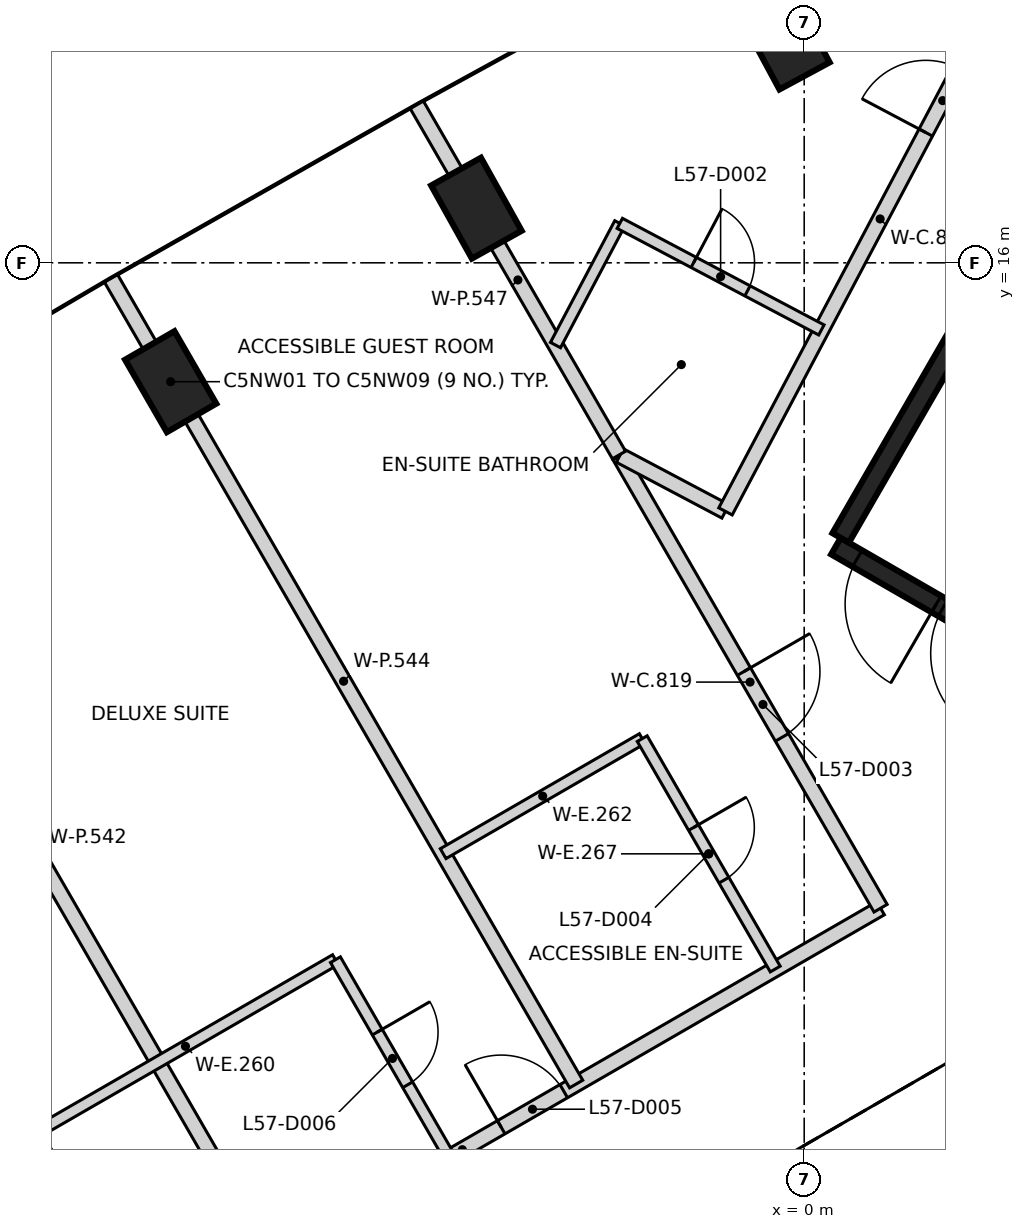
"""IFC4 building model, lengths in metres.
Left out: names, types, materials, properties, quantities, classifications, styles, units other than length and angle.
Written with IfcOpenShell. Run it as: python <this file> out.ifc"""

import sys

from ifc_helpers import new_model, si_unit, direction, frame, frame_2d, origin, origin_2d, place, context, subcontext, project, spatial, rectangle, extrude, element, fill, save


model = new_model("IFC4")
c1 = context("Model", 3, precision=1e-05, world=origin(), true_north=direction((0.0, 1.0)))
c2 = subcontext(c1, "Body", "Model", "MODEL_VIEW")
j1 = project(units=[si_unit("LENGTHUNIT", "METRE"), si_unit("PLANEANGLEUNIT", "RADIAN")], contexts=[c1])
p1 = place(None, origin())
s1 = spatial("IfcSite", under=j1, at=p1, CompositionType="ELEMENT")
p2 = place(p1, origin())
s2 = spatial("IfcBuilding", under=s1, at=p2, CompositionType="ELEMENT")
p3 = place(p2, frame((0.0, 0.0, 228.6)))
s3 = spatial("IfcBuildingStorey", under=s2, at=p3, CompositionType="ELEMENT", Elevation=228.6)
for number, where, z_axis, x_axis in (
    (1, (-0.256, 18.943, -0.35), (0.0, 0.0, 1.0), (-0.475, 0.88, 0.0)),
    (2, (-4.312, 16.719, -0.35), (0.0, 0.0, 1.0), (-0.487, 0.873, 0.0)),
    (3, (-8.335, 14.436, -0.35), (0.0, 0.0, 1.0), (-0.5, 0.866, 0.0)),
):
    element("IfcColumn", number, at=place(p3, frame(where, z_axis=z_axis, x_axis=x_axis)), inside=s3, PredefinedType="COLUMN", context=c2, shape_type="SweptSolid", body=[
        extrude(rectangle(XDim=1.1, YDim=0.75, at=origin_2d()), origin(), (0.0, 0.0, 1.0), 3.6),
    ])
p4 = place(p3, frame((10.42, 6.498, 0.0), z_axis=(0.0, 0.0, 1.0), x_axis=(-0.866021906294, 0.500006057782, 0.0)))
e4 = element("IfcWall", 4, at=p4, inside=s3, PredefinedType="SHEAR", context=c2, shape_type="SweptSolid", body=[
    extrude(rectangle(XDim=11.55, YDim=0.25, at=frame_2d((5.775, 0.0))), origin(), (0.0, 0.0, 1.0), 3.25),
])
p5 = place(p4, frame((10.025, 0.0, 0.0)))
e5 = element("IfcOpeningElement", 5, at=p5, cuts=e4, PredefinedType="OPENING", context=c2, shape_type="SweptSolid", body=[
    extrude(rectangle(XDim=1.2, YDim=2.1, at=frame_2d((0.6, 1.05))), frame((0.0, 0.135, 0.0), z_axis=(0.0, -1.0, 0.0), x_axis=(1.0, 0.0, 0.0)), (0.0, 0.0, 1.0), 0.27),
])
p6 = place(p4, frame((8.725, 0.0, 0.0)))
e6 = element("IfcOpeningElement", 6, at=p6, cuts=e4, PredefinedType="OPENING", context=c2, shape_type="SweptSolid", body=[
    extrude(rectangle(XDim=1.2, YDim=2.1, at=frame_2d((0.6, 1.05))), frame((0.0, 0.135, 0.0), z_axis=(0.0, -1.0, 0.0), x_axis=(1.0, 0.0, 0.0)), (0.0, 0.0, 1.0), 0.27),
])
p7 = place(p3, frame((0.48, 12.381, 0.0), z_axis=(0.0, 0.0, 1.0), x_axis=(0.49999885962, 0.866026062182, 0.0)))
e7 = element("IfcWall", 7, at=p7, inside=s3, PredefinedType="SHEAR", context=c2, shape_type="SweptSolid", body=[
    extrude(rectangle(XDim=5.225, YDim=0.25, at=frame_2d((2.612, 0.0))), origin(), (0.0, 0.0, 1.0), 3.25),
])
p8 = place(p3, frame((-10.0, 1.155, 0.0), z_axis=(0.0, 0.0, 1.0), x_axis=(0.866014095592, 0.500019585852, 0.0)))
e8 = element("IfcWall", 8, at=p8, inside=s3, PredefinedType="PARTITIONING", context=c2, shape_type="SweptSolid", body=[
    extrude(rectangle(XDim=12.708, YDim=0.2, at=frame_2d((6.354, 0.0))), origin(), (0.0, 0.0, 1.0), 3.25),
])
p9 = place(p8, frame((6.944, 0.0, 0.0)))
e9 = element("IfcOpeningElement", 9, at=p9, cuts=e8, PredefinedType="OPENING", context=c2, shape_type="SweptSolid", body=[
    extrude(rectangle(XDim=0.95, YDim=2.1, at=frame_2d((0.475, 1.05))), frame((0.0, 0.11, 0.0), z_axis=(0.0, -1.0, 0.0), x_axis=(1.0, 0.0, 0.0)), (0.0, 0.0, 1.0), 0.22),
])
p10 = place(p8, frame((0.2, 0.0, 0.0)))
e10 = element("IfcOpeningElement", 10, at=p10, cuts=e8, PredefinedType="OPENING", context=c2, shape_type="SweptSolid", body=[
    extrude(rectangle(XDim=0.95, YDim=2.1, at=frame_2d((0.475, 1.05))), frame((0.0, 0.11, 0.0), z_axis=(0.0, -1.0, 0.0), x_axis=(1.0, 0.0, 0.0)), (0.0, 0.0, 1.0), 0.22),
])
p11 = place(p3, frame((-2.43, 13.459, 0.0), z_axis=(0.0, 0.0, 1.0), x_axis=(0.499957265187, -0.866050075334, 0.0)))
e11 = element("IfcWall", 11, at=p11, inside=s3, PredefinedType="PARTITIONING", context=c2, shape_type="SweptSolid", body=[
    extrude(rectangle(XDim=6.87, YDim=0.2, at=frame_2d((3.435, 0.0))), origin(), (0.0, 0.0, 1.0), 3.25),
])
p12 = place(p11, frame((3.275, 0.0, 0.0)))
e12 = element("IfcOpeningElement", 12, at=p12, cuts=e11, PredefinedType="OPENING", context=c2, shape_type="SweptSolid", body=[
    extrude(rectangle(XDim=1.0, YDim=2.1, at=frame_2d((0.5, 1.05))), frame((0.0, 0.11, 0.0), z_axis=(0.0, -1.0, 0.0), x_axis=(1.0, 0.0, 0.0)), (0.0, 0.0, 1.0), 0.22),
])
p13 = place(p3, frame((-2.425, 13.465, 0.0), z_axis=(0.0, 0.0, 1.0), x_axis=(0.883874806572, -0.467723557572, 0.0)))
e13 = element("IfcWall", 13, at=p13, inside=s3, PredefinedType="PARTITIONING", context=c2, shape_type="SweptSolid", body=[
    extrude(rectangle(XDim=1.572, YDim=0.2, at=frame_2d((0.786, 0.0))), origin(), (0.0, 0.0, 1.0), 3.25),
])
p14 = place(p3, frame((-1.035, 12.73, 0.0), z_axis=(0.0, 0.0, 1.0), x_axis=(0.46738248691, 0.884055208078, 0.0)))
e14 = element("IfcWall", 14, at=p14, inside=s3, PredefinedType="PARTITIONING", context=c2, shape_type="SweptSolid", body=[
    extrude(rectangle(XDim=8.705, YDim=0.2, at=frame_2d((4.352, 0.0))), origin(), (0.0, 0.0, 1.0), 3.25),
])
p15 = place(p14, frame((5.638, 0.0, 0.0)))
e15 = element("IfcOpeningElement", 15, at=p15, cuts=e14, PredefinedType="OPENING", context=c2, shape_type="SweptSolid", body=[
    extrude(rectangle(XDim=0.95, YDim=2.1, at=frame_2d((0.475, 1.05))), frame((0.0, 0.11, 0.0), z_axis=(0.0, -1.0, 0.0), x_axis=(1.0, 0.0, 0.0)), (0.0, 0.0, 1.0), 0.22),
])
p16 = place(p3, frame((-13.107, 13.453, 0.0), z_axis=(0.0, 0.0, 1.0), x_axis=(0.500037611077, -0.86600368793, 0.0)))
e16 = element("IfcWall", 16, at=p16, inside=s3, PredefinedType="PARTITIONING", context=c2, shape_type="SweptSolid", body=[
    extrude(rectangle(XDim=12.204, YDim=0.2, at=frame_2d((6.102, 0.0))), origin(), (0.0, 0.0, 1.0), 3.25),
])
p17 = place(p3, frame((-9.119, 15.795, 0.0), z_axis=(0.0, 0.0, 1.0), x_axis=(0.50001601051, -0.866016159915, 0.0)))
e17 = element("IfcWall", 17, at=p17, inside=s3, PredefinedType="PARTITIONING", context=c2, shape_type="SweptSolid", body=[
    extrude(rectangle(XDim=12.238, YDim=0.2, at=frame_2d((6.119, 0.0))), origin(), (0.0, 0.0, 1.0), 3.25),
])
p18 = place(p3, frame((-5.097, 18.078, 0.0), z_axis=(0.0, 0.0, 1.0), x_axis=(0.50004820116, -0.865997573043, 0.0)))
e18 = element("IfcWall", 18, at=p18, inside=s3, PredefinedType="PARTITIONING", context=c2, shape_type="SweptSolid", body=[
    extrude(rectangle(XDim=5.32, YDim=0.2, at=frame_2d((2.66, 0.0))), origin(), (0.0, 0.0, 1.0), 3.25),
])
p19 = place(p3, frame((-10.114, 4.553, 0.0), z_axis=(0.0, 0.0, 1.0), x_axis=(0.50002537861, -0.866010750942, 0.0)))
e19 = element("IfcWall", 19, at=p19, inside=s3, PredefinedType="PARTITIONING", context=c2, shape_type="SweptSolid", body=[
    extrude(rectangle(XDim=3.0, YDim=0.15, at=frame_2d((1.5, 0.0))), origin(), (0.0, 0.0, 1.0), 3.25),
])
p20 = place(p19, frame((1.1, 0.0, 0.0)))
e20 = element("IfcOpeningElement", 20, at=p20, cuts=e19, PredefinedType="OPENING", context=c2, shape_type="SweptSolid", body=[
    extrude(rectangle(XDim=0.8, YDim=2.1, at=frame_2d((0.4, 1.05))), frame((0.0, 0.085, 0.0), z_axis=(0.0, -1.0, 0.0), x_axis=(1.0, 0.0, 0.0)), (0.0, 0.0, 1.0), 0.17),
])
p21 = place(p3, frame((-10.114, 4.553, 0.0), z_axis=(0.0, 0.0, 1.0), x_axis=(0.866002713795, 0.500039298155, 0.0)))
e21 = element("IfcWall", 21, at=p21, inside=s3, PredefinedType="PARTITIONING", context=c2, shape_type="SweptSolid", body=[
    extrude(rectangle(XDim=4.558, YDim=0.15, at=frame_2d((2.279, 0.0))), origin(), (0.0, 0.0, 1.0), 3.25),
])
p22 = place(p3, frame((-6.167, 6.832, 0.0), z_axis=(0.0, 0.0, 1.0), x_axis=(0.499990139034, -0.866031096941, 0.0)))
e22 = element("IfcWall", 22, at=p22, inside=s3, PredefinedType="PARTITIONING", context=c2, shape_type="SweptSolid", body=[
    extrude(rectangle(XDim=3.0, YDim=0.15, at=frame_2d((1.5, 0.0))), origin(), (0.0, 0.0, 1.0), 3.25),
])
p23 = place(p22, frame((1.1, 0.0, 0.0)))
e23 = element("IfcOpeningElement", 23, at=p23, cuts=e22, PredefinedType="OPENING", context=c2, shape_type="SweptSolid", body=[
    extrude(rectangle(XDim=0.8, YDim=2.1, at=frame_2d((0.4, 1.05))), frame((0.0, 0.085, 0.0), z_axis=(0.0, -1.0, 0.0), x_axis=(1.0, 0.0, 0.0)), (0.0, 0.0, 1.0), 0.17),
])
p24 = place(p3, frame((-4.75, 8.227, 0.0), z_axis=(0.0, 0.0, 1.0), x_axis=(0.865893821749, 0.500227837548, 0.0)))
e24 = element("IfcWall", 24, at=p24, inside=s3, PredefinedType="PARTITIONING", context=c2, shape_type="SweptSolid", body=[
    extrude(rectangle(XDim=3.024, YDim=0.15, at=frame_2d((1.512, 0.0))), origin(), (0.0, 0.0, 1.0), 3.25),
])
p25 = place(p3, frame((-3.272, 14.918, 0.0), z_axis=(0.0, 0.0, 1.0), x_axis=(0.467162796658, 0.884171319043, 0.0)))
e25 = element("IfcWall", 25, at=p25, inside=s3, PredefinedType="PARTITIONING", context=c2, shape_type="SweptSolid", body=[
    extrude(rectangle(XDim=1.811, YDim=0.15, at=frame_2d((0.905, 0.0))), origin(), (0.0, 0.0, 1.0), 3.25),
])
p26 = place(p3, frame((-2.426, 16.519, 0.0), z_axis=(0.0, 0.0, 1.0), x_axis=(0.884056991815, -0.467379112952, 0.0)))
e26 = element("IfcWall", 26, at=p26, inside=s3, PredefinedType="PARTITIONING", context=c2, shape_type="SweptSolid", body=[
    extrude(rectangle(XDim=3.0, YDim=0.15, at=frame_2d((1.5, 0.0))), origin(), (0.0, 0.0, 1.0), 3.25),
])
p27 = place(p26, frame((1.1, 0.0, 0.0)))
e27 = element("IfcOpeningElement", 27, at=p27, cuts=e26, PredefinedType="OPENING", context=c2, shape_type="SweptSolid", body=[
    extrude(rectangle(XDim=0.8, YDim=2.1, at=frame_2d((0.4, 1.05))), frame((0.0, 0.085, 0.0), z_axis=(0.0, -1.0, 0.0), x_axis=(1.0, 0.0, 0.0)), (0.0, 0.0, 1.0), 0.17),
])
p28 = place(p3, frame((-2.131, 9.74, 0.0), z_axis=(0.0, 0.0, 1.0), x_axis=(0.500010275428, -0.866019471182, 0.0)))
e28 = element("IfcWall", 28, at=p28, inside=s3, PredefinedType="PARTITIONING", context=c2, shape_type="SweptSolid", body=[
    extrude(rectangle(XDim=3.5, YDim=0.15, at=frame_2d((1.75, 0.0))), origin(), (0.0, 0.0, 1.0), 3.25),
])
p29 = place(p28, frame((1.35, 0.0, 0.0)))
e29 = element("IfcOpeningElement", 29, at=p29, cuts=e28, PredefinedType="OPENING", context=c2, shape_type="SweptSolid", body=[
    extrude(rectangle(XDim=0.8, YDim=2.1, at=frame_2d((0.4, 1.05))), frame((0.0, 0.085, 0.0), z_axis=(0.0, -1.0, 0.0), x_axis=(1.0, 0.0, 0.0)), (0.0, 0.0, 1.0), 0.17),
])
p30 = place(p5, origin())
e30 = element("IfcDoor", 30, at=p30, inside=s3, OperationType="SINGLE_SWING_LEFT", PredefinedType="DOOR", context=c2, shape_type="SweptSolid", body=[
    extrude(rectangle(XDim=1.2, YDim=2.1, at=frame_2d((0.6, 1.05))), frame((0.0, 0.025, 0.0), z_axis=(0.0, -1.0, 0.0), x_axis=(1.0, 0.0, 0.0)), (0.0, 0.0, 1.0), 0.05),
])
fill(e5, e30)
p31 = place(p6, origin())
e31 = element("IfcDoor", 31, at=p31, inside=s3, OperationType="SINGLE_SWING_RIGHT", PredefinedType="DOOR", context=c2, shape_type="SweptSolid", body=[
    extrude(rectangle(XDim=1.2, YDim=2.1, at=frame_2d((0.6, 1.05))), frame((0.0, 0.025, 0.0), z_axis=(0.0, -1.0, 0.0), x_axis=(1.0, 0.0, 0.0)), (0.0, 0.0, 1.0), 0.05),
])
fill(e6, e31)
p32 = place(p15, frame((0.95, 0.0, 0.0), z_axis=(0.0, 0.0, 1.0), x_axis=(-1.0, 0.0, 0.0)))
e32 = element("IfcDoor", 32, at=p32, inside=s3, OperationType="SINGLE_SWING_LEFT", PredefinedType="DOOR", context=c2, shape_type="SweptSolid", body=[
    extrude(rectangle(XDim=0.95, YDim=2.1, at=frame_2d((0.475, 1.05))), frame((0.0, 0.025, 0.0), z_axis=(0.0, -1.0, 0.0), x_axis=(1.0, 0.0, 0.0)), (0.0, 0.0, 1.0), 0.05),
])
fill(e15, e32)
p33 = place(p27, origin())
e33 = element("IfcDoor", 33, at=p33, inside=s3, OperationType="SINGLE_SWING_LEFT", PredefinedType="DOOR", context=c2, shape_type="SweptSolid", body=[
    extrude(rectangle(XDim=0.8, YDim=2.1, at=frame_2d((0.4, 1.05))), frame((0.0, 0.025, 0.0), z_axis=(0.0, -1.0, 0.0), x_axis=(1.0, 0.0, 0.0)), (0.0, 0.0, 1.0), 0.05),
])
fill(e27, e33)
p34 = place(p12, frame((1.0, 0.0, 0.0), z_axis=(0.0, 0.0, 1.0), x_axis=(-1.0, 0.0, 0.0)))
e34 = element("IfcDoor", 34, at=p34, inside=s3, OperationType="SINGLE_SWING_LEFT", PredefinedType="DOOR", context=c2, shape_type="SweptSolid", body=[
    extrude(rectangle(XDim=1.0, YDim=2.1, at=frame_2d((0.5, 1.05))), frame((0.0, 0.025, 0.0), z_axis=(0.0, -1.0, 0.0), x_axis=(1.0, 0.0, 0.0)), (0.0, 0.0, 1.0), 0.05),
])
fill(e12, e34)
p35 = place(p29, frame((0.8, 0.0, 0.0), z_axis=(0.0, 0.0, 1.0), x_axis=(-1.0, 0.0, 0.0)))
e35 = element("IfcDoor", 35, at=p35, inside=s3, OperationType="SINGLE_SWING_LEFT", PredefinedType="DOOR", context=c2, shape_type="SweptSolid", body=[
    extrude(rectangle(XDim=0.8, YDim=2.1, at=frame_2d((0.4, 1.05))), frame((0.0, 0.025, 0.0), z_axis=(0.0, -1.0, 0.0), x_axis=(1.0, 0.0, 0.0)), (0.0, 0.0, 1.0), 0.05),
])
fill(e29, e35)
p36 = place(p9, origin())
e36 = element("IfcDoor", 36, at=p36, inside=s3, OperationType="SINGLE_SWING_LEFT", PredefinedType="DOOR", context=c2, shape_type="SweptSolid", body=[
    extrude(rectangle(XDim=0.95, YDim=2.1, at=frame_2d((0.475, 1.05))), frame((0.0, 0.025, 0.0), z_axis=(0.0, -1.0, 0.0), x_axis=(1.0, 0.0, 0.0)), (0.0, 0.0, 1.0), 0.05),
])
fill(e9, e36)
p37 = place(p23, frame((0.8, 0.0, 0.0), z_axis=(0.0, 0.0, 1.0), x_axis=(-1.0, 0.0, 0.0)))
e37 = element("IfcDoor", 37, at=p37, inside=s3, OperationType="SINGLE_SWING_LEFT", PredefinedType="DOOR", context=c2, shape_type="SweptSolid", body=[
    extrude(rectangle(XDim=0.8, YDim=2.1, at=frame_2d((0.4, 1.05))), frame((0.0, 0.025, 0.0), z_axis=(0.0, -1.0, 0.0), x_axis=(1.0, 0.0, 0.0)), (0.0, 0.0, 1.0), 0.05),
])
fill(e23, e37)
save(model, sys.argv[1])
